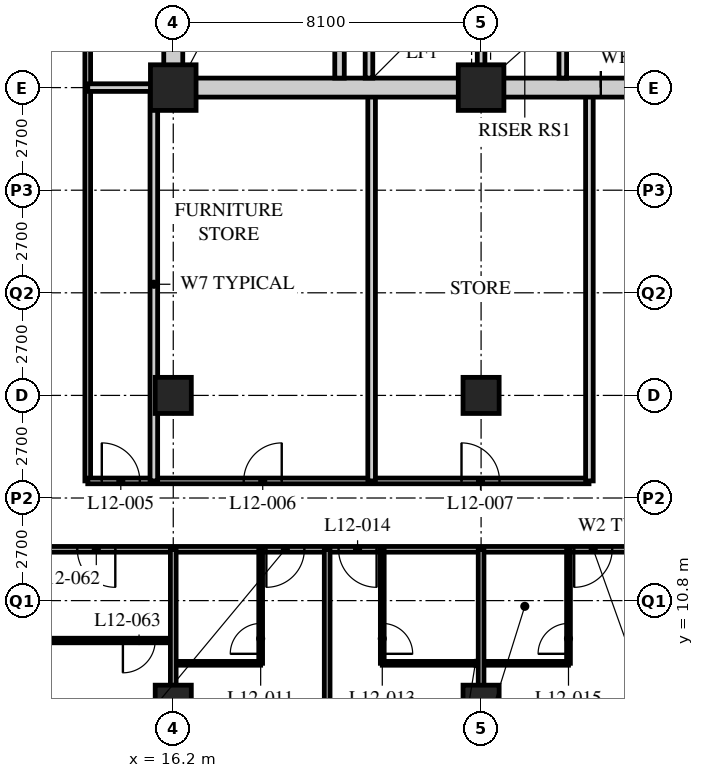
"""IFC4 building model, lengths in metres.
Left out: names, types, materials, properties, quantities, classifications, styles, units other than length and angle.
Written with IfcOpenShell. Run it as: python <this file> out.ifc"""

import sys

from ifc_helpers import new_model, si_unit, direction, frame, frame_2d, origin, origin_2d, place, context, subcontext, project, spatial, rectangle, hollow_rectangle, extrude, element, fill, save


model = new_model("IFC4")
c1 = context("Model", 3, precision=1e-05, world=origin(), true_north=direction((0.0, 1.0)))
c2 = subcontext(c1, "Body", "Model", "MODEL_VIEW")
j1 = project(units=[si_unit("LENGTHUNIT", "METRE"), si_unit("PLANEANGLEUNIT", "RADIAN")], contexts=[c1])
p1 = place(None, origin())
s1 = spatial("IfcSite", under=j1, at=p1, CompositionType="ELEMENT")
p2 = place(p1, origin())
s2 = spatial("IfcBuilding", under=s1, at=p2, CompositionType="ELEMENT")
p3 = place(p2, frame((0.0, 0.0, 53.4)))
s3 = spatial("IfcBuildingStorey", under=s2, at=p3, CompositionType="ELEMENT", Elevation=53.4)
for number, where, z_axis, x_axis in (
    (1, (16.2, 8.1, 0.0), (0.0, 0.0, 1.0), (1.0, 0.0, 0.0)),
    (2, (16.2, 16.2, 0.0), (0.0, 0.0, 1.0), (1.0, 0.0, 0.0)),
):
    element("IfcColumn", number, at=place(p3, frame(where, z_axis=z_axis, x_axis=x_axis)), inside=s3, PredefinedType="COLUMN", context=c2, shape_type="SweptSolid", body=[
        extrude(hollow_rectangle(XDim=0.95, YDim=0.95, WallThickness=0.095, at=origin_2d()), origin(), (0.0, 0.0, 1.0), 3.4),
    ])
p4 = place(p3, frame((16.2, 24.3, 0.0), z_axis=(0.0, 0.0, 1.0), x_axis=(1.0, 0.0, 0.0)))
e3 = element("IfcColumn", 3, at=p4, inside=s3, PredefinedType="COLUMN", context=c2, shape_type="SweptSolid", body=[
    extrude(hollow_rectangle(XDim=1.2, YDim=1.2, WallThickness=0.12, at=origin_2d()), origin(), (0.0, 0.0, 1.0), 3.4),
])
for number, where, z_axis, x_axis in (
    (4, (24.3, 8.1, 0.0), (0.0, 0.0, 1.0), (1.0, 0.0, 0.0)),
    (5, (24.3, 16.2, 0.0), (0.0, 0.0, 1.0), (1.0, 0.0, 0.0)),
):
    element("IfcColumn", number, at=place(p3, frame(where, z_axis=z_axis, x_axis=x_axis)), inside=s3, PredefinedType="COLUMN", context=c2, shape_type="SweptSolid", body=[
        extrude(hollow_rectangle(XDim=0.95, YDim=0.95, WallThickness=0.095, at=origin_2d()), origin(), (0.0, 0.0, 1.0), 3.4),
    ])
p5 = place(p3, frame((24.3, 24.3, 0.0), z_axis=(0.0, 0.0, 1.0), x_axis=(1.0, 0.0, 0.0)))
e6 = element("IfcColumn", 6, at=p5, inside=s3, PredefinedType="COLUMN", context=c2, shape_type="SweptSolid", body=[
    extrude(hollow_rectangle(XDim=1.2, YDim=1.2, WallThickness=0.12, at=origin_2d()), origin(), (0.0, 0.0, 1.0), 3.4),
])
p6 = place(p3, frame((12.15, 12.15, 0.0), z_axis=(0.0, 0.0, 1.0), x_axis=(1.0, 0.0, 0.0)))
e7 = element("IfcWall", 7, at=p6, inside=s3, PredefinedType="PARTITIONING", context=c2, shape_type="SweptSolid", body=[
    extrude(rectangle(XDim=32.4, YDim=0.15, at=frame_2d((16.2, 0.0))), origin(), (0.0, 0.0, 1.0), 3.19),
])
p7 = place(p6, frame((6.5, 0.0, 0.0)))
e8 = element("IfcOpeningElement", 8, at=p7, cuts=e7, PredefinedType="OPENING", context=c2, shape_type="SweptSolid", body=[
    extrude(rectangle(XDim=1.0, YDim=2.1, at=frame_2d((0.5, 1.05))), frame((0.0, 0.085, 0.0), z_axis=(0.0, -1.0, 0.0), x_axis=(1.0, 0.0, 0.0)), (0.0, 0.0, 1.0), 0.17),
])
p8 = place(p6, frame((8.4, 0.0, 0.0)))
e9 = element("IfcOpeningElement", 9, at=p8, cuts=e7, PredefinedType="OPENING", context=c2, shape_type="SweptSolid", body=[
    extrude(rectangle(XDim=1.0, YDim=2.1, at=frame_2d((0.5, 1.05))), frame((0.0, 0.085, 0.0), z_axis=(0.0, -1.0, 0.0), x_axis=(1.0, 0.0, 0.0)), (0.0, 0.0, 1.0), 0.17),
])
p9 = place(p6, frame((14.6, 0.0, 0.0)))
e10 = element("IfcOpeningElement", 10, at=p9, cuts=e7, PredefinedType="OPENING", context=c2, shape_type="SweptSolid", body=[
    extrude(rectangle(XDim=1.0, YDim=2.1, at=frame_2d((0.5, 1.05))), frame((0.0, 0.085, 0.0), z_axis=(0.0, -1.0, 0.0), x_axis=(1.0, 0.0, 0.0)), (0.0, 0.0, 1.0), 0.17),
])
p10 = place(p6, frame((18.65, 0.0, 0.0)))
e11 = element("IfcOpeningElement", 11, at=p10, cuts=e7, PredefinedType="OPENING", context=c2, shape_type="SweptSolid", body=[
    extrude(rectangle(XDim=1.0, YDim=2.1, at=frame_2d((0.5, 1.05))), frame((0.0, 0.085, 0.0), z_axis=(0.0, -1.0, 0.0), x_axis=(1.0, 0.0, 0.0)), (0.0, 0.0, 1.0), 0.17),
])
p11 = place(p6, frame((20.55, 0.0, 0.0)))
e12 = element("IfcOpeningElement", 12, at=p11, cuts=e7, PredefinedType="OPENING", context=c2, shape_type="SweptSolid", body=[
    extrude(rectangle(XDim=1.0, YDim=2.1, at=frame_2d((0.5, 1.05))), frame((0.0, 0.085, 0.0), z_axis=(0.0, -1.0, 0.0), x_axis=(1.0, 0.0, 0.0)), (0.0, 0.0, 1.0), 0.17),
])
p12 = place(p6, frame((26.75, 0.0, 0.0)))
e13 = element("IfcOpeningElement", 13, at=p12, cuts=e7, PredefinedType="OPENING", context=c2, shape_type="SweptSolid", body=[
    extrude(rectangle(XDim=1.0, YDim=2.1, at=frame_2d((0.5, 1.05))), frame((0.0, 0.085, 0.0), z_axis=(0.0, -1.0, 0.0), x_axis=(1.0, 0.0, 0.0)), (0.0, 0.0, 1.0), 0.17),
])
p13 = place(p6, frame((1.525, 0.0, 0.0)))
e14 = element("IfcOpeningElement", 14, at=p13, cuts=e7, PredefinedType="OPENING", context=c2, shape_type="SweptSolid", body=[
    extrude(rectangle(XDim=1.0, YDim=2.1, at=frame_2d((0.5, 1.05))), frame((0.0, 0.085, 0.0), z_axis=(0.0, -1.0, 0.0), x_axis=(1.0, 0.0, 0.0)), (0.0, 0.0, 1.0), 0.17),
])
p14 = place(p6, frame((29.875, 0.0, 0.0)))
e15 = element("IfcOpeningElement", 15, at=p14, cuts=e7, PredefinedType="OPENING", context=c2, shape_type="SweptSolid", body=[
    extrude(rectangle(XDim=1.0, YDim=2.1, at=frame_2d((0.5, 1.05))), frame((0.0, 0.085, 0.0), z_axis=(0.0, -1.0, 0.0), x_axis=(1.0, 0.0, 0.0)), (0.0, 0.0, 1.0), 0.17),
])
p15 = place(p3, frame((13.95, 40.5, 0.0), z_axis=(0.0, 0.0, 1.0), x_axis=(0.0, -1.0, 0.0)))
e16 = element("IfcWall", 16, at=p15, inside=s3, PredefinedType="PARTITIONING", context=c2, shape_type="SweptSolid", body=[
    extrude(rectangle(XDim=26.55, YDim=0.15, at=frame_2d((13.275, 0.0))), origin(), (0.0, 0.0, 1.0), 3.19),
])
p16 = place(p15, frame((11.65, 0.0, 0.0)))
e17 = element("IfcOpeningElement", 17, at=p16, cuts=e16, PredefinedType="OPENING", context=c2, shape_type="SweptSolid", body=[
    extrude(rectangle(XDim=1.0, YDim=2.1, at=frame_2d((0.5, 1.05))), frame((0.0, 0.085, 0.0), z_axis=(0.0, -1.0, 0.0), x_axis=(1.0, 0.0, 0.0)), (0.0, 0.0, 1.0), 0.17),
])
p17 = place(p15, frame((3.55, 0.0, 0.0)))
e18 = element("IfcOpeningElement", 18, at=p17, cuts=e16, PredefinedType="OPENING", context=c2, shape_type="SweptSolid", body=[
    extrude(rectangle(XDim=1.0, YDim=2.1, at=frame_2d((0.5, 1.05))), frame((0.0, 0.085, 0.0), z_axis=(0.0, -1.0, 0.0), x_axis=(1.0, 0.0, 0.0)), (0.0, 0.0, 1.0), 0.17),
])
p18 = place(p3, frame((13.95, 13.95, 0.0), z_axis=(0.0, 0.0, 1.0), x_axis=(1.0, 0.0, 0.0)))
e19 = element("IfcWall", 19, at=p18, inside=s3, PredefinedType="PARTITIONING", context=c2, shape_type="SweptSolid", body=[
    extrude(rectangle(XDim=13.19, YDim=0.15, at=frame_2d((6.595, 0.0))), origin(), (0.0, 0.0, 1.0), 3.19),
])
p19 = place(p18, frame((0.37, 0.0, 0.0)))
e20 = element("IfcOpeningElement", 20, at=p19, cuts=e19, PredefinedType="OPENING", context=c2, shape_type="SweptSolid", body=[
    extrude(rectangle(XDim=1.0, YDim=2.1, at=frame_2d((0.5, 1.05))), frame((0.0, 0.085, 0.0), z_axis=(0.0, -1.0, 0.0), x_axis=(1.0, 0.0, 0.0)), (0.0, 0.0, 1.0), 0.17),
])
p20 = place(p18, frame((4.104, 0.0, 0.0)))
e21 = element("IfcOpeningElement", 21, at=p20, cuts=e19, PredefinedType="OPENING", context=c2, shape_type="SweptSolid", body=[
    extrude(rectangle(XDim=1.0, YDim=2.1, at=frame_2d((0.5, 1.05))), frame((0.0, 0.085, 0.0), z_axis=(0.0, -1.0, 0.0), x_axis=(1.0, 0.0, 0.0)), (0.0, 0.0, 1.0), 0.17),
])
p21 = place(p18, frame((9.835, 0.0, 0.0)))
e22 = element("IfcOpeningElement", 22, at=p21, cuts=e19, PredefinedType="OPENING", context=c2, shape_type="SweptSolid", body=[
    extrude(rectangle(XDim=1.0, YDim=2.1, at=frame_2d((0.5, 1.05))), frame((0.0, 0.085, 0.0), z_axis=(0.0, -1.0, 0.0), x_axis=(1.0, 0.0, 0.0)), (0.0, 0.0, 1.0), 0.17),
])
for number, where, z_axis, x_axis in (
    (23, (15.689, 13.95, 0.0), (0.0, 0.0, 1.0), (0.0, 1.0, 0.0)),
    (24, (21.42, 13.95, 0.0), (0.0, 0.0, 1.0), (0.0, 1.0, 0.0)),
    (25, (27.15, 13.95, 0.0), (0.0, 0.0, 1.0), (0.0, 1.0, 0.0)),
):
    element("IfcWall", number, at=place(p3, frame(where, z_axis=z_axis, x_axis=x_axis)), inside=s3, PredefinedType="SOLIDWALL", context=c2, shape_type="SweptSolid", body=[
        extrude(rectangle(XDim=10.35, YDim=0.2, at=frame_2d((5.175, 0.0))), origin(), (0.0, 0.0, 1.0), 3.19),
    ])
p22 = place(p3, frame((13.95, 24.3, 0.0), z_axis=(0.0, 0.0, 1.0), x_axis=(1.0, 0.0, 0.0)))
e26 = element("IfcWall", 26, at=p22, inside=s3, PredefinedType="SOLIDWALL", context=c2, shape_type="SweptSolid", body=[
    extrude(rectangle(XDim=2.25, YDim=0.2, at=frame_2d((1.125, 0.0))), origin(), (0.0, 0.0, 1.0), 2.578),
])
p23 = place(p3, frame((16.2, 9.15, 0.0), z_axis=(0.0, 0.0, 1.0), x_axis=(1.0, 0.0, 0.0)))
e27 = element("IfcWall", 27, at=p23, inside=s3, PredefinedType="PARTITIONING", context=c2, shape_type="SweptSolid", body=[
    extrude(rectangle(XDim=2.3, YDim=0.1, at=frame_2d((1.15, 0.0))), origin(), (0.0, 0.0, 1.0), 3.19),
])
p24 = place(p3, frame((18.5, 12.15, 0.0), z_axis=(0.0, 0.0, 1.0), x_axis=(0.0, -1.0, 0.0)))
e28 = element("IfcWall", 28, at=p24, inside=s3, PredefinedType="PARTITIONING", context=c2, shape_type="SweptSolid", body=[
    extrude(rectangle(XDim=3.0, YDim=0.1, at=frame_2d((1.5, 0.0))), origin(), (0.0, 0.0, 1.0), 3.19),
])
p25 = place(p24, frame((1.95, 0.0, 0.0)))
e29 = element("IfcOpeningElement", 29, at=p25, cuts=e28, PredefinedType="OPENING", context=c2, shape_type="SweptSolid", body=[
    extrude(rectangle(XDim=0.8, YDim=2.1, at=frame_2d((0.4, 1.05))), frame((0.0, 0.06, 0.0), z_axis=(0.0, -1.0, 0.0), x_axis=(1.0, 0.0, 0.0)), (0.0, 0.0, 1.0), 0.12),
])
p26 = place(p3, frame((20.25, 12.15, 0.0), z_axis=(0.0, 0.0, 1.0), x_axis=(0.0, -1.0, 0.0)))
e30 = element("IfcWall", 30, at=p26, inside=s3, PredefinedType="PARTITIONING", context=c2, shape_type="SweptSolid", body=[
    extrude(rectangle(XDim=11.85, YDim=0.15, at=frame_2d((5.925, 0.0))), origin(), (0.0, 0.0, 1.0), 3.19),
])
p27 = place(p3, frame((21.7, 9.15, 0.0), z_axis=(0.0, 0.0, 1.0), x_axis=(1.0, 0.0, 0.0)))
e31 = element("IfcWall", 31, at=p27, inside=s3, PredefinedType="PARTITIONING", context=c2, shape_type="SweptSolid", body=[
    extrude(rectangle(XDim=4.9, YDim=0.1, at=frame_2d((2.45, 0.0))), origin(), (0.0, 0.0, 1.0), 3.19),
])
p28 = place(p3, frame((21.7, 12.15, 0.0), z_axis=(0.0, 0.0, 1.0), x_axis=(0.0, -1.0, 0.0)))
e32 = element("IfcWall", 32, at=p28, inside=s3, PredefinedType="PARTITIONING", context=c2, shape_type="SweptSolid", body=[
    extrude(rectangle(XDim=3.0, YDim=0.1, at=frame_2d((1.5, 0.0))), origin(), (0.0, 0.0, 1.0), 3.19),
])
p29 = place(p28, frame((1.95, 0.0, 0.0)))
e33 = element("IfcOpeningElement", 33, at=p29, cuts=e32, PredefinedType="OPENING", context=c2, shape_type="SweptSolid", body=[
    extrude(rectangle(XDim=0.8, YDim=2.1, at=frame_2d((0.4, 1.05))), frame((0.0, 0.06, 0.0), z_axis=(0.0, -1.0, 0.0), x_axis=(1.0, 0.0, 0.0)), (0.0, 0.0, 1.0), 0.12),
])
p30 = place(p3, frame((24.3, 12.15, 0.0), z_axis=(0.0, 0.0, 1.0), x_axis=(0.0, -1.0, 0.0)))
e34 = element("IfcWall", 34, at=p30, inside=s3, PredefinedType="PARTITIONING", context=c2, shape_type="SweptSolid", body=[
    extrude(rectangle(XDim=11.85, YDim=0.15, at=frame_2d((5.925, 0.0))), origin(), (0.0, 0.0, 1.0), 2.578),
])
p31 = place(p3, frame((26.6, 12.15, 0.0), z_axis=(0.0, 0.0, 1.0), x_axis=(0.0, -1.0, 0.0)))
e35 = element("IfcWall", 35, at=p31, inside=s3, PredefinedType="PARTITIONING", context=c2, shape_type="SweptSolid", body=[
    extrude(rectangle(XDim=3.0, YDim=0.1, at=frame_2d((1.5, 0.0))), origin(), (0.0, 0.0, 1.0), 3.19),
])
p32 = place(p31, frame((1.95, 0.0, 0.0)))
e36 = element("IfcOpeningElement", 36, at=p32, cuts=e35, PredefinedType="OPENING", context=c2, shape_type="SweptSolid", body=[
    extrude(rectangle(XDim=0.8, YDim=2.1, at=frame_2d((0.4, 1.05))), frame((0.0, 0.06, 0.0), z_axis=(0.0, -1.0, 0.0), x_axis=(1.0, 0.0, 0.0)), (0.0, 0.0, 1.0), 0.12),
])
p33 = place(p3, frame((8.15, 9.75, 0.0), z_axis=(0.0, 0.0, 1.0), x_axis=(1.0, 0.0, 0.0)))
e37 = element("IfcWall", 37, at=p33, inside=s3, PredefinedType="PARTITIONING", context=c2, shape_type="SweptSolid", body=[
    extrude(rectangle(XDim=8.05, YDim=0.12, at=frame_2d((4.025, 0.0))), origin(), (0.0, 0.0, 1.0), 3.19),
])
p34 = place(p33, frame((6.725, 0.0, 0.0)))
e38 = element("IfcOpeningElement", 38, at=p34, cuts=e37, PredefinedType="OPENING", context=c2, shape_type="SweptSolid", body=[
    extrude(rectangle(XDim=0.85, YDim=2.1, at=frame_2d((0.425, 1.05))), frame((0.0, 0.07, 0.0), z_axis=(0.0, -1.0, 0.0), x_axis=(1.0, 0.0, 0.0)), (0.0, 0.0, 1.0), 0.14),
])
p35 = place(p33, frame((2.875, 0.0, 0.0)))
e39 = element("IfcOpeningElement", 39, at=p35, cuts=e37, PredefinedType="OPENING", context=c2, shape_type="SweptSolid", body=[
    extrude(rectangle(XDim=0.85, YDim=2.1, at=frame_2d((0.425, 1.05))), frame((0.0, 0.07, 0.0), z_axis=(0.0, -1.0, 0.0), x_axis=(1.0, 0.0, 0.0)), (0.0, 0.0, 1.0), 0.14),
])
p36 = place(p3, frame((16.2, 12.15, 0.0), z_axis=(0.0, 0.0, 1.0), x_axis=(0.0, -1.0, 0.0)))
e40 = element("IfcWall", 40, at=p36, inside=s3, PredefinedType="PARTITIONING", context=c2, shape_type="SweptSolid", body=[
    extrude(rectangle(XDim=11.85, YDim=0.15, at=frame_2d((5.925, 0.0))), origin(), (0.0, 0.0, 1.0), 2.578),
])
p37 = place(p3, frame((15.95, 24.3, 0.0), z_axis=(0.0, 0.0, 1.0), x_axis=(1.0, 0.0, 0.0)))
e41 = element("IfcWall", 41, at=p37, inside=s3, PredefinedType="SOLIDWALL", context=c2, shape_type="SweptSolid", body=[
    extrude(rectangle(XDim=24.8, YDim=0.5, at=frame_2d((12.4, 0.0))), origin(), (0.0, 0.0, 1.0), 2.54),
])
p38 = place(p37, frame((11.5, 0.0, 0.0)))
e42 = element("IfcOpeningElement", 42, at=p38, cuts=e41, PredefinedType="OPENING", context=c2, shape_type="SweptSolid", body=[
    extrude(rectangle(XDim=1.8, YDim=2.4, at=frame_2d((0.9, 1.2))), frame((0.0, 0.26, 0.0), z_axis=(0.0, -1.0, 0.0), x_axis=(1.0, 0.0, 0.0)), (0.0, 0.0, 1.0), 0.52),
])
p39 = place(p3, frame((16.2, 24.55, 0.0), z_axis=(0.0, 0.0, 1.0), x_axis=(0.0, 1.0, 0.0)))
e43 = element("IfcWall", 43, at=p39, inside=s3, PredefinedType="SOLIDWALL", context=c2, shape_type="SweptSolid", body=[
    extrude(rectangle(XDim=15.7, YDim=0.5, at=frame_2d((7.85, 0.0))), origin(), (0.0, 0.0, 1.0), 2.578),
])
p40 = place(p3, frame((24.3, 24.55, 0.0), z_axis=(0.0, 0.0, 1.0), x_axis=(0.0, 1.0, 0.0)))
e44 = element("IfcWall", 44, at=p40, inside=s3, PredefinedType="SOLIDWALL", context=c2, shape_type="SweptSolid", body=[
    extrude(rectangle(XDim=7.75, YDim=0.2, at=frame_2d((3.875, 0.0))), origin(), (0.0, 0.0, 1.0), 2.578),
])
p41 = place(p40, frame((4.6, 0.0, 0.0)))
e45 = element("IfcOpeningElement", 45, at=p41, cuts=e44, PredefinedType="OPENING", context=c2, shape_type="SweptSolid", body=[
    extrude(rectangle(XDim=1.2, YDim=2.1, at=frame_2d((0.6, 1.05))), frame((0.0, 0.11, 0.0), z_axis=(0.0, -1.0, 0.0), x_axis=(1.0, 0.0, 0.0)), (0.0, 0.0, 1.0), 0.22),
])
p42 = place(p3, frame((20.575, 24.55, 0.0), z_axis=(0.0, 0.0, 1.0), x_axis=(0.0, 1.0, 0.0)))
e46 = element("IfcWall", 46, at=p42, inside=s3, PredefinedType="SOLIDWALL", context=c2, shape_type="SweptSolid", body=[
    extrude(rectangle(XDim=7.75, YDim=0.25, at=frame_2d((3.875, 0.0))), origin(), (0.0, 0.0, 1.0), 3.19),
])
p43 = place(p42, frame((6.2, 0.0, 0.0)))
e47 = element("IfcOpeningElement", 47, at=p43, cuts=e46, PredefinedType="OPENING", context=c2, shape_type="SweptSolid", body=[
    extrude(rectangle(XDim=1.2, YDim=2.1, at=frame_2d((0.6, 1.05))), frame((0.0, 0.135, 0.0), z_axis=(0.0, -1.0, 0.0), x_axis=(1.0, 0.0, 0.0)), (0.0, 0.0, 1.0), 0.27),
])
p44 = place(p3, frame((21.35, 24.55, 0.0), z_axis=(0.0, 0.0, 1.0), x_axis=(0.0, 1.0, 0.0)))
e48 = element("IfcWall", 48, at=p44, inside=s3, PredefinedType="SOLIDWALL", context=c2, shape_type="SweptSolid", body=[
    extrude(rectangle(XDim=2.6, YDim=0.2, at=frame_2d((1.3, 0.0))), origin(), (0.0, 0.0, 1.0), 3.19),
])
p45 = place(p3, frame((26.45, 24.55, 0.0), z_axis=(0.0, 0.0, 1.0), x_axis=(0.0, 1.0, 0.0)))
e49 = element("IfcWall", 49, at=p45, inside=s3, PredefinedType="SOLIDWALL", context=c2, shape_type="SweptSolid", body=[
    extrude(rectangle(XDim=1.6, YDim=0.2, at=frame_2d((0.8, 0.0))), origin(), (0.0, 0.0, 1.0), 3.19),
])
p46 = place(p19, origin())
e50 = element("IfcDoor", 50, at=p46, inside=s3, OperationType="SINGLE_SWING_LEFT", PredefinedType="DOOR", context=c2, shape_type="SweptSolid", body=[
    extrude(rectangle(XDim=1.0, YDim=2.1, at=frame_2d((0.5, 1.05))), frame((0.0, 0.025, 0.0), z_axis=(0.0, -1.0, 0.0), x_axis=(1.0, 0.0, 0.0)), (0.0, 0.0, 1.0), 0.05),
])
fill(e20, e50)
p47 = place(p20, origin())
e51 = element("IfcDoor", 51, at=p47, inside=s3, OperationType="SINGLE_SWING_RIGHT", PredefinedType="DOOR", context=c2, shape_type="SweptSolid", body=[
    extrude(rectangle(XDim=1.0, YDim=2.1, at=frame_2d((0.5, 1.05))), frame((0.0, 0.025, 0.0), z_axis=(0.0, -1.0, 0.0), x_axis=(1.0, 0.0, 0.0)), (0.0, 0.0, 1.0), 0.05),
])
fill(e21, e51)
p48 = place(p21, origin())
e52 = element("IfcDoor", 52, at=p48, inside=s3, OperationType="SINGLE_SWING_LEFT", PredefinedType="DOOR", context=c2, shape_type="SweptSolid", body=[
    extrude(rectangle(XDim=1.0, YDim=2.1, at=frame_2d((0.5, 1.05))), frame((0.0, 0.025, 0.0), z_axis=(0.0, -1.0, 0.0), x_axis=(1.0, 0.0, 0.0)), (0.0, 0.0, 1.0), 0.05),
])
fill(e22, e52)
p49 = place(p25, origin())
e53 = element("IfcDoor", 53, at=p49, inside=s3, OperationType="SINGLE_SWING_LEFT", PredefinedType="DOOR", context=c2, shape_type="SweptSolid", body=[
    extrude(rectangle(XDim=0.8, YDim=2.1, at=frame_2d((0.4, 1.05))), frame((0.0, 0.025, 0.0), z_axis=(0.0, -1.0, 0.0), x_axis=(1.0, 0.0, 0.0)), (0.0, 0.0, 1.0), 0.05),
])
fill(e29, e53)
p50 = place(p7, origin())
e54 = element("IfcDoor", 54, at=p50, inside=s3, OperationType="SINGLE_SWING_RIGHT", PredefinedType="DOOR", context=c2, shape_type="SweptSolid", body=[
    extrude(rectangle(XDim=1.0, YDim=2.1, at=frame_2d((0.5, 1.05))), frame((0.0, 0.025, 0.0), z_axis=(0.0, -1.0, 0.0), x_axis=(1.0, 0.0, 0.0)), (0.0, 0.0, 1.0), 0.05),
])
fill(e8, e54)
p51 = place(p29, origin())
e55 = element("IfcDoor", 55, at=p51, inside=s3, OperationType="SINGLE_SWING_RIGHT", PredefinedType="DOOR", context=c2, shape_type="SweptSolid", body=[
    extrude(rectangle(XDim=0.8, YDim=2.1, at=frame_2d((0.4, 1.05))), frame((0.0, 0.025, 0.0), z_axis=(0.0, -1.0, 0.0), x_axis=(1.0, 0.0, 0.0)), (0.0, 0.0, 1.0), 0.05),
])
fill(e33, e55)
p52 = place(p8, origin())
e56 = element("IfcDoor", 56, at=p52, inside=s3, OperationType="SINGLE_SWING_LEFT", PredefinedType="DOOR", context=c2, shape_type="SweptSolid", body=[
    extrude(rectangle(XDim=1.0, YDim=2.1, at=frame_2d((0.5, 1.05))), frame((0.0, 0.025, 0.0), z_axis=(0.0, -1.0, 0.0), x_axis=(1.0, 0.0, 0.0)), (0.0, 0.0, 1.0), 0.05),
])
fill(e9, e56)
p53 = place(p32, origin())
e57 = element("IfcDoor", 57, at=p53, inside=s3, OperationType="SINGLE_SWING_LEFT", PredefinedType="DOOR", context=c2, shape_type="SweptSolid", body=[
    extrude(rectangle(XDim=0.8, YDim=2.1, at=frame_2d((0.4, 1.05))), frame((0.0, 0.025, 0.0), z_axis=(0.0, -1.0, 0.0), x_axis=(1.0, 0.0, 0.0)), (0.0, 0.0, 1.0), 0.05),
])
fill(e36, e57)
p54 = place(p9, origin())
e58 = element("IfcDoor", 58, at=p54, inside=s3, OperationType="SINGLE_SWING_RIGHT", PredefinedType="DOOR", context=c2, shape_type="SweptSolid", body=[
    extrude(rectangle(XDim=1.0, YDim=2.1, at=frame_2d((0.5, 1.05))), frame((0.0, 0.025, 0.0), z_axis=(0.0, -1.0, 0.0), x_axis=(1.0, 0.0, 0.0)), (0.0, 0.0, 1.0), 0.05),
])
fill(e10, e58)
p55 = place(p13, origin())
e59 = element("IfcDoor", 59, at=p55, inside=s3, OperationType="SINGLE_SWING_LEFT", PredefinedType="DOOR", context=c2, shape_type="SweptSolid", body=[
    extrude(rectangle(XDim=1.0, YDim=2.1, at=frame_2d((0.5, 1.05))), frame((0.0, 0.025, 0.0), z_axis=(0.0, -1.0, 0.0), x_axis=(1.0, 0.0, 0.0)), (0.0, 0.0, 1.0), 0.05),
])
fill(e14, e59)
p56 = place(p34, origin())
e60 = element("IfcDoor", 60, at=p56, inside=s3, OperationType="SINGLE_SWING_RIGHT", PredefinedType="DOOR", context=c2, shape_type="SweptSolid", body=[
    extrude(rectangle(XDim=0.85, YDim=2.1, at=frame_2d((0.425, 1.05))), frame((0.0, 0.025, 0.0), z_axis=(0.0, -1.0, 0.0), x_axis=(1.0, 0.0, 0.0)), (0.0, 0.0, 1.0), 0.05),
])
fill(e38, e60)
p57 = place(p38, origin())
e61 = element("IfcDoor", 61, at=p57, inside=s3, OperationType="DOUBLE_DOOR_SINGLE_SWING", PredefinedType="DOOR", context=c2, shape_type="SweptSolid", body=[
    extrude(rectangle(XDim=1.8, YDim=2.4, at=frame_2d((0.9, 1.2))), frame((0.0, 0.025, 0.0), z_axis=(0.0, -1.0, 0.0), x_axis=(1.0, 0.0, 0.0)), (0.0, 0.0, 1.0), 0.05),
])
fill(e42, e61)
save(model, sys.argv[1])
